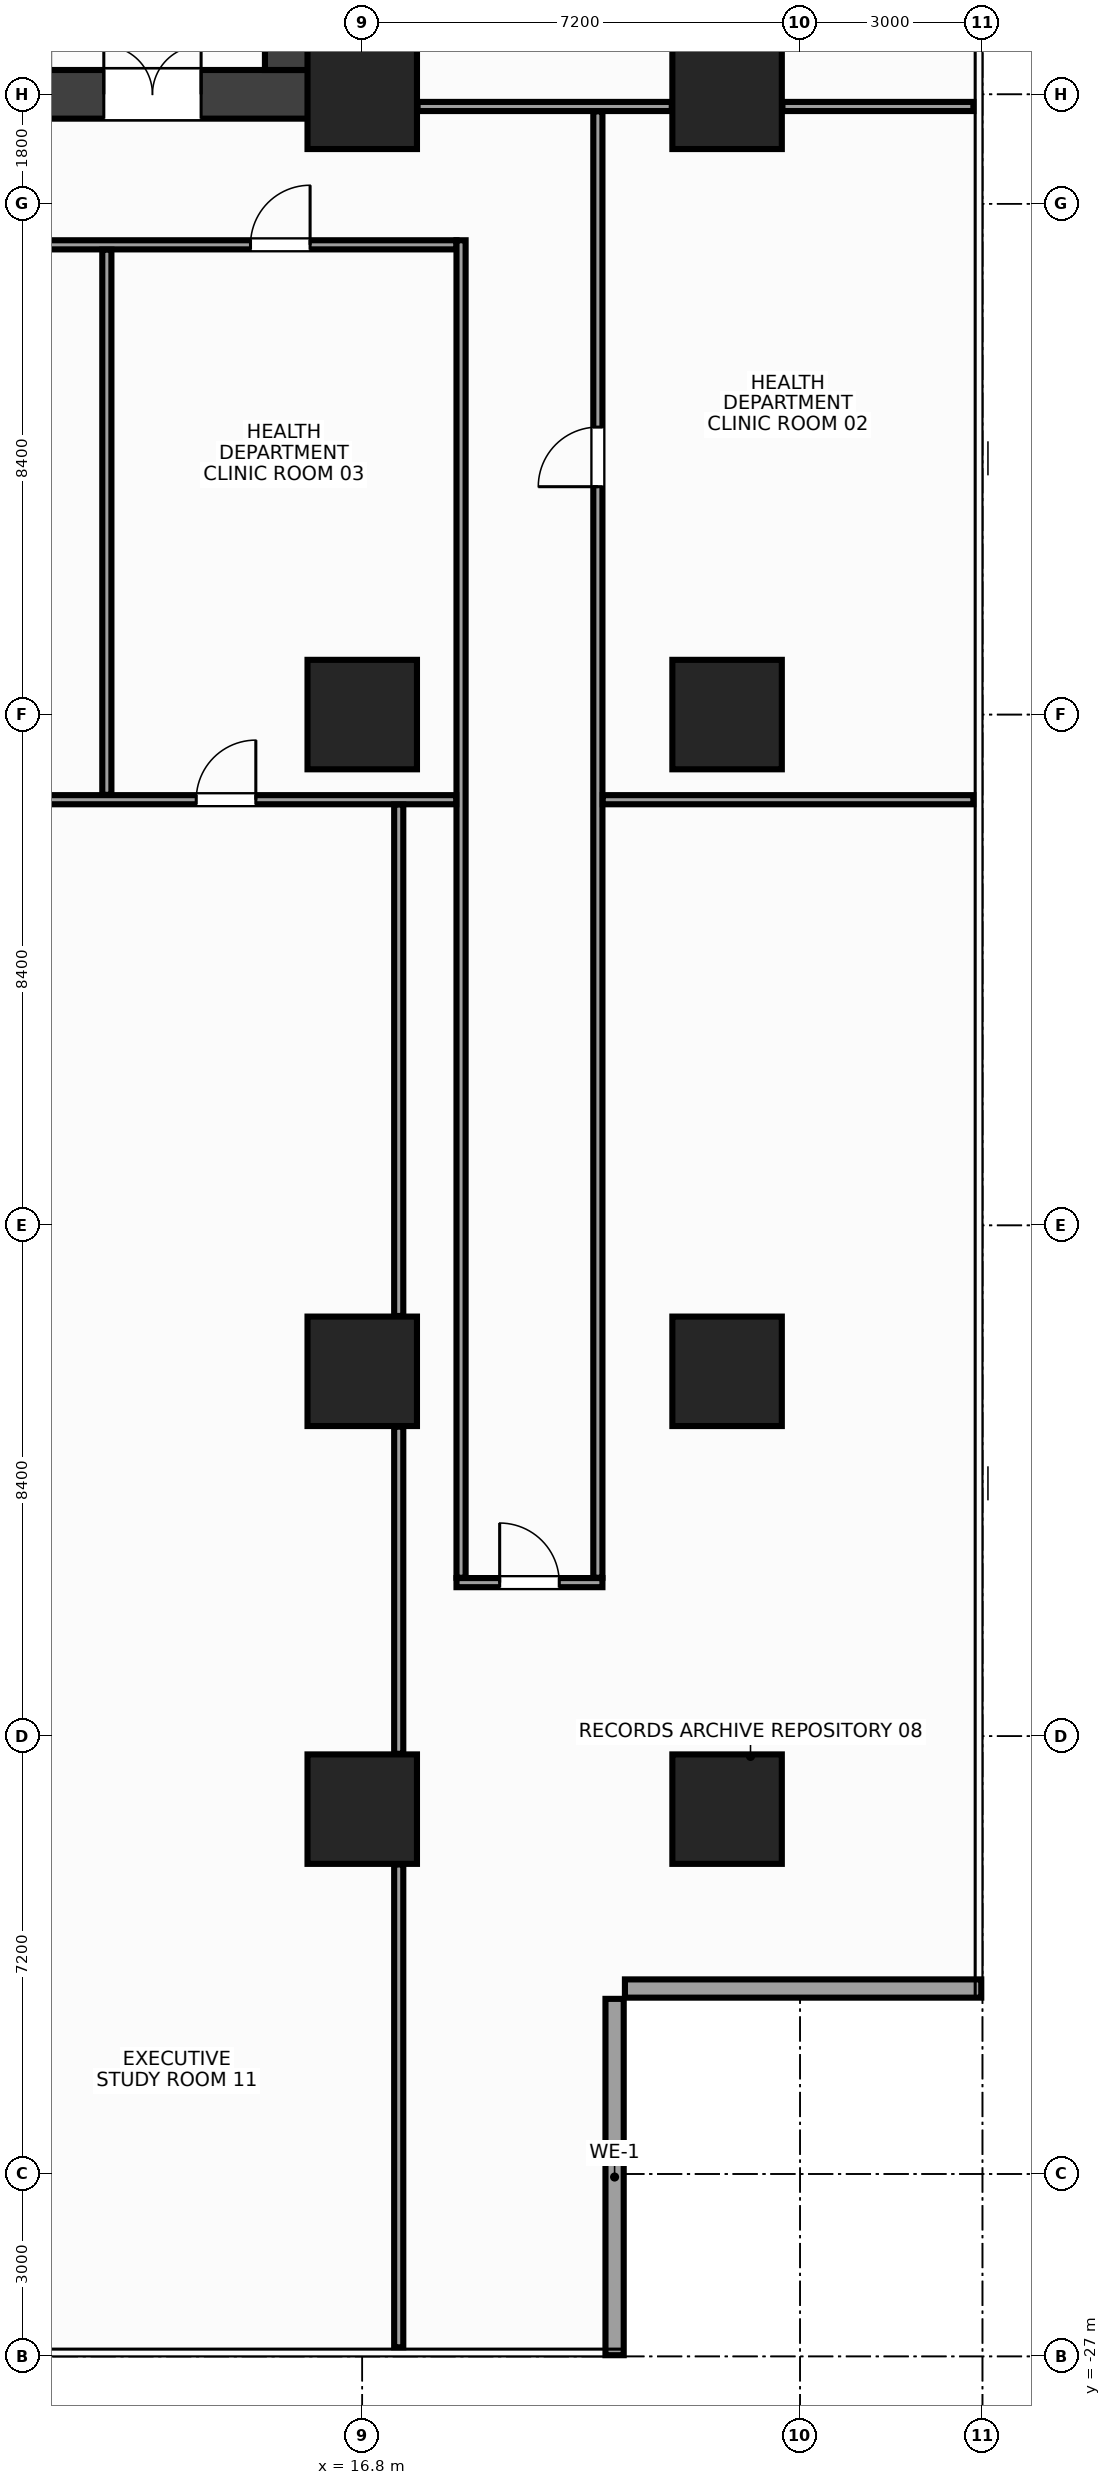
"""IFC4 building model, lengths in metres.
Left out: names, types, materials, properties, quantities, classifications, styles, units other than length and angle.
Written with IfcOpenShell. Run it as: python <this file> out.ifc"""

import sys

from ifc_helpers import new_model, si_unit, direction, frame, frame_2d, origin, origin_2d, place, context, subcontext, project, spatial, rectangle, extrude, source, transform, mapped, element, fill, save


model = new_model("IFC4")
c1 = context("Model", 3, precision=1e-05, world=origin(), true_north=direction((0.0, 1.0)))
c2 = subcontext(c1, "Body", "Model", "MODEL_VIEW")
j1 = project(units=[si_unit("LENGTHUNIT", "METRE"), si_unit("PLANEANGLEUNIT", "RADIAN")], contexts=[c1])
p1 = place(None, origin())
s1 = spatial("IfcSite", under=j1, at=p1, CompositionType="ELEMENT")
p2 = place(p1, origin())
s2 = spatial("IfcBuilding", under=s1, at=p2, CompositionType="ELEMENT")
p3 = place(p2, frame((0.0, 0.0, 52.4)))
s3 = spatial("IfcBuildingStorey", under=s2, at=p3, CompositionType="ELEMENT", Elevation=52.4)
m1 = source(origin(), c2, "Body", "SweptSolid", [
    extrude(rectangle(XDim=32.0, YDim=0.8, at=frame_2d((16.0, 0.0))), origin(), (0.0, 0.0, 1.0), 3.6),
])
p4 = place(p3, frame((-16.0, 10.2, 0.0), z_axis=(0.0, 0.0, 1.0), x_axis=(1.0, 0.0, 0.0)))
e1 = element("IfcWall", 1, at=p4, inside=s3, PredefinedType="SHEAR", context=c2, shape_type="MappedRepresentation", body=[
    mapped(m1, transform((0.0, 0.0, 0.0), x_axis=(1.0, 0.0, 0.0), y_axis=(0.0, 1.0, 0.0), z_axis=(0.0, 0.0, 1.0), scale=1.0)),
])
p5 = place(p4, frame((1.85, 0.0, 0.0)))
e2 = element("IfcOpeningElement", 2, at=p5, cuts=e1, PredefinedType="OPENING", context=c2, shape_type="SweptSolid", body=[
    extrude(rectangle(XDim=1.6, YDim=2.15, at=frame_2d((0.8, 1.075))), frame((0.0, 0.412, 0.0), z_axis=(0.0, -1.0, 0.0), x_axis=(1.0, 0.0, 0.0)), (0.0, 0.0, 1.0), 0.824),
])
p6 = place(p4, frame((28.55, 0.0, 0.0)))
e3 = element("IfcOpeningElement", 3, at=p6, cuts=e1, PredefinedType="OPENING", context=c2, shape_type="SweptSolid", body=[
    extrude(rectangle(XDim=1.6, YDim=2.15, at=frame_2d((0.8, 1.075))), frame((0.0, 0.412, 0.0), z_axis=(0.0, -1.0, 0.0), x_axis=(1.0, 0.0, 0.0)), (0.0, 0.0, 1.0), 0.824),
])
p7 = place(p4, frame((15.25, 0.0, 0.0)))
e4 = element("IfcOpeningElement", 4, at=p7, cuts=e1, PredefinedType="OPENING", context=c2, shape_type="SweptSolid", body=[
    extrude(rectangle(XDim=1.5, YDim=2.2, at=frame_2d((0.75, 1.1))), frame((0.0, 0.412, 0.0), z_axis=(0.0, -1.0, 0.0), x_axis=(1.0, 0.0, 0.0)), (0.0, 0.0, 1.0), 0.824),
])
m2 = source(origin(), c2, "Body", "SweptSolid", [
    extrude(rectangle(XDim=12.8, YDim=0.8, at=frame_2d((6.4, 0.0))), origin(), (0.0, 0.0, 1.0), 3.6),
])
p8 = place(p3, frame((15.6, 10.6, 0.0), z_axis=(0.0, 0.0, 1.0), x_axis=(0.0, 1.0, 0.0)))
e5 = element("IfcWall", 5, at=p8, inside=s3, PredefinedType="SHEAR", context=c2, shape_type="MappedRepresentation", body=[
    mapped(m2, transform((0.0, 0.0, 0.0), x_axis=(1.0, 0.0, 0.0), y_axis=(0.0, 1.0, 0.0), z_axis=(0.0, 0.0, 1.0), scale=1.0)),
])
m3 = source(origin(), c2, "Body", "SweptSolid", [
    extrude(rectangle(XDim=1.8, YDim=1.8, at=origin_2d()), origin(), (0.0, 0.0, 1.0), 3.6),
])
for number, where, z_axis, x_axis in (
    (6, (16.8, -18.0, 0.0), (0.0, 0.0, 1.0), (1.0, 0.0, 0.0)),
    (7, (16.8, -10.8, 0.0), (0.0, 0.0, 1.0), (1.0, 0.0, 0.0)),
    (8, (16.8, 0.0, 0.0), (0.0, 0.0, 1.0), (1.0, 0.0, 0.0)),
    (9, (16.8, 10.2, 0.0), (0.0, 0.0, 1.0), (1.0, 0.0, 0.0)),
    (10, (22.8, -18.0, 0.0), (0.0, 0.0, 1.0), (1.0, 0.0, 0.0)),
    (11, (22.8, -10.8, 0.0), (0.0, 0.0, 1.0), (1.0, 0.0, 0.0)),
    (12, (22.8, 0.0, 0.0), (0.0, 0.0, 1.0), (1.0, 0.0, 0.0)),
    (13, (22.8, 10.2, 0.0), (0.0, 0.0, 1.0), (1.0, 0.0, 0.0)),
):
    element("IfcColumn", number, at=place(p3, frame(where, z_axis=z_axis, x_axis=x_axis)), inside=s3, PredefinedType="COLUMN", context=c2, shape_type="MappedRepresentation", body=[
        mapped(m3, transform((0.0, 0.0, 0.0), x_axis=(1.0, 0.0, 0.0), y_axis=(0.0, 1.0, 0.0), z_axis=(0.0, 0.0, 1.0), scale=1.0)),
    ])
m4 = source(origin(), c2, "Body", "SweptSolid", [
    extrude(rectangle(XDim=5.86, YDim=0.3, at=frame_2d((2.93, 0.0))), origin(), (0.0, 0.0, 1.0), 2.74),
])
for number, where, z_axis, x_axis in (
    (14, (20.95, -26.98, 0.0), (0.0, 0.0, 1.0), (0.0, 1.0, 0.0)),
    (15, (21.12, -20.95, 0.0), (0.0, 0.0, 1.0), (1.0, 0.0, 0.0)),
):
    element("IfcWall", number, at=place(p3, frame(where, z_axis=z_axis, x_axis=x_axis)), inside=s3, PredefinedType="STANDARD", context=c2, shape_type="MappedRepresentation", body=[
        mapped(m4, transform((0.0, 0.0, 0.0), x_axis=(1.0, 0.0, 0.0), y_axis=(0.0, 1.0, 0.0), z_axis=(0.0, 0.0, 1.0), scale=1.0)),
    ])
m5 = source(origin(), c2, "Body", "SweptSolid", [
    extrude(rectangle(XDim=4.18, YDim=0.15, at=frame_2d((2.09, 0.0))), origin(), (0.0, 0.0, 1.0), 2.745),
])
p9 = place(p3, frame((17.71, 10.0, 0.0), z_axis=(0.0, 0.0, 1.0), x_axis=(1.0, 0.0, 0.0)))
e16 = element("IfcWall", 16, at=p9, inside=s3, PredefinedType="PARTITIONING", context=c2, shape_type="MappedRepresentation", body=[
    mapped(m5, transform((0.0, 0.0, 0.0), x_axis=(1.0, 0.0, 0.0), y_axis=(0.0, 1.0, 0.0), z_axis=(0.0, 0.0, 1.0), scale=1.0)),
])
m6 = source(origin(), c2, "Body", "SweptSolid", [
    extrude(rectangle(XDim=3.14, YDim=0.15, at=frame_2d((1.57, 0.0))), origin(), (0.0, 0.0, 1.0), 2.435),
])
p10 = place(p3, frame((23.71, 10.0, 0.0), z_axis=(0.0, 0.0, 1.0), x_axis=(1.0, 0.0, 0.0)))
e17 = element("IfcWall", 17, at=p10, inside=s3, PredefinedType="PARTITIONING", context=c2, shape_type="MappedRepresentation", body=[
    mapped(m6, transform((0.0, 0.0, 0.0), x_axis=(1.0, 0.0, 0.0), y_axis=(0.0, 1.0, 0.0), z_axis=(0.0, 0.0, 1.0), scale=1.0)),
])
m7 = source(origin(), c2, "Body", "SweptSolid", [
    extrude(rectangle(XDim=36.7, YDim=0.15, at=frame_2d((18.35, 0.0))), origin(), (0.0, 0.0, 1.0), 2.745),
])
p11 = place(p3, frame((-18.35, 7.725, 0.0), z_axis=(0.0, 0.0, 1.0), x_axis=(1.0, 0.0, 0.0)))
e18 = element("IfcWall", 18, at=p11, inside=s3, PredefinedType="PARTITIONING", context=c2, shape_type="MappedRepresentation", body=[
    mapped(m7, transform((0.0, 0.0, 0.0), x_axis=(1.0, 0.0, 0.0), y_axis=(0.0, 1.0, 0.0), z_axis=(0.0, 0.0, 1.0), scale=1.0)),
])
p12 = place(p11, frame((33.312, 0.0, 0.0)))
e19 = element("IfcOpeningElement", 19, at=p12, cuts=e18, PredefinedType="OPENING", context=c2, shape_type="SweptSolid", body=[
    extrude(rectangle(XDim=0.98, YDim=2.15, at=frame_2d((0.49, 1.075))), frame((0.0, 0.087, 0.0), z_axis=(0.0, -1.0, 0.0), x_axis=(1.0, 0.0, 0.0)), (0.0, 0.0, 1.0), 0.174),
])
p13 = place(p11, frame((4.107, 0.0, 0.0)))
e20 = element("IfcOpeningElement", 20, at=p13, cuts=e18, PredefinedType="OPENING", context=c2, shape_type="SweptSolid", body=[
    extrude(rectangle(XDim=0.98, YDim=2.15, at=frame_2d((0.49, 1.075))), frame((0.0, 0.087, 0.0), z_axis=(0.0, -1.0, 0.0), x_axis=(1.0, 0.0, 0.0)), (0.0, 0.0, 1.0), 0.174),
])
p14 = place(p11, frame((14.46, 0.0, 0.0)))
e21 = element("IfcOpeningElement", 21, at=p14, cuts=e18, PredefinedType="OPENING", context=c2, shape_type="SweptSolid", body=[
    extrude(rectangle(XDim=0.98, YDim=2.15, at=frame_2d((0.49, 1.075))), frame((0.0, 0.087, 0.0), z_axis=(0.0, -1.0, 0.0), x_axis=(1.0, 0.0, 0.0)), (0.0, 0.0, 1.0), 0.174),
])
p15 = place(p11, frame((25.36, 0.0, 0.0)))
e22 = element("IfcOpeningElement", 22, at=p15, cuts=e18, PredefinedType="OPENING", context=c2, shape_type="SweptSolid", body=[
    extrude(rectangle(XDim=0.98, YDim=2.15, at=frame_2d((0.49, 1.075))), frame((0.0, 0.087, 0.0), z_axis=(0.0, -1.0, 0.0), x_axis=(1.0, 0.0, 0.0)), (0.0, 0.0, 1.0), 0.174),
])
m8 = source(origin(), c2, "Body", "SweptSolid", [
    extrude(rectangle(XDim=2.4, YDim=0.15, at=frame_2d((1.2, 0.0))), origin(), (0.0, 0.0, 1.0), 2.985),
])
p16 = place(p3, frame((18.35, -14.275, 0.0), z_axis=(0.0, 0.0, 1.0), x_axis=(1.0, 0.0, 0.0)))
e23 = element("IfcWall", 23, at=p16, inside=s3, PredefinedType="PARTITIONING", context=c2, shape_type="MappedRepresentation", body=[
    mapped(m8, transform((0.0, 0.0, 0.0), x_axis=(1.0, 0.0, 0.0), y_axis=(0.0, 1.0, 0.0), z_axis=(0.0, 0.0, 1.0), scale=1.0)),
])
p17 = place(p16, frame((0.71, 0.0, 0.0)))
e24 = element("IfcOpeningElement", 24, at=p17, cuts=e23, PredefinedType="OPENING", context=c2, shape_type="SweptSolid", body=[
    extrude(rectangle(XDim=0.98, YDim=2.15, at=frame_2d((0.49, 1.075))), frame((0.0, 0.087, 0.0), z_axis=(0.0, -1.0, 0.0), x_axis=(1.0, 0.0, 0.0)), (0.0, 0.0, 1.0), 0.174),
])
m9 = source(origin(), c2, "Body", "SweptSolid", [
    extrude(rectangle(XDim=21.995, YDim=0.15, at=frame_2d((10.998, 0.0))), origin(), (0.0, 0.0, 1.0), 2.745),
])
p18 = place(p3, frame((18.425, -14.195, 0.0), z_axis=(0.0, 0.0, 1.0), x_axis=(0.0, 1.0, 0.0)))
e25 = element("IfcWall", 25, at=p18, inside=s3, PredefinedType="PARTITIONING", context=c2, shape_type="MappedRepresentation", body=[
    mapped(m9, transform((0.0, 0.0, 0.0), x_axis=(1.0, 0.0, 0.0), y_axis=(0.0, 1.0, 0.0), z_axis=(0.0, 0.0, 1.0), scale=1.0)),
])
m10 = source(origin(), c2, "Body", "SweptSolid", [
    extrude(rectangle(XDim=24.115, YDim=0.15, at=frame_2d((12.058, 0.0))), origin(), (0.0, 0.0, 1.0), 2.745),
])
p19 = place(p3, frame((20.675, -14.195, 0.0), z_axis=(0.0, 0.0, 1.0), x_axis=(0.0, 1.0, 0.0)))
e26 = element("IfcWall", 26, at=p19, inside=s3, PredefinedType="PARTITIONING", context=c2, shape_type="MappedRepresentation", body=[
    mapped(m10, transform((0.0, 0.0, 0.0), x_axis=(1.0, 0.0, 0.0), y_axis=(0.0, 1.0, 0.0), z_axis=(0.0, 0.0, 1.0), scale=1.0)),
])
p20 = place(p19, frame((17.942, 0.0, 0.0)))
e27 = element("IfcOpeningElement", 27, at=p20, cuts=e26, PredefinedType="OPENING", context=c2, shape_type="SweptSolid", body=[
    extrude(rectangle(XDim=0.98, YDim=2.15, at=frame_2d((0.49, 1.075))), frame((0.0, 0.087, 0.0), z_axis=(0.0, -1.0, 0.0), x_axis=(1.0, 0.0, 0.0)), (0.0, 0.0, 1.0), 0.174),
])
m11 = source(origin(), c2, "Body", "SweptSolid", [
    extrude(rectangle(XDim=36.69, YDim=0.15, at=frame_2d((18.345, 0.0))), origin(), (0.0, 0.0, 1.0), 2.745),
])
p21 = place(p3, frame((-18.345, -1.4, 0.0), z_axis=(0.0, 0.0, 1.0), x_axis=(1.0, 0.0, 0.0)))
e28 = element("IfcWall", 28, at=p21, inside=s3, PredefinedType="PARTITIONING", context=c2, shape_type="MappedRepresentation", body=[
    mapped(m11, transform((0.0, 0.0, 0.0), x_axis=(1.0, 0.0, 0.0), y_axis=(0.0, 1.0, 0.0), z_axis=(0.0, 0.0, 1.0), scale=1.0)),
])
p22 = place(p21, frame((14.455, 0.0, 0.0)))
e29 = element("IfcOpeningElement", 29, at=p22, cuts=e28, PredefinedType="OPENING", context=c2, shape_type="SweptSolid", body=[
    extrude(rectangle(XDim=0.98, YDim=2.15, at=frame_2d((0.49, 1.075))), frame((0.0, 0.087, 0.0), z_axis=(0.0, -1.0, 0.0), x_axis=(1.0, 0.0, 0.0)), (0.0, 0.0, 1.0), 0.174),
])
p23 = place(p21, frame((4.055, 0.0, 0.0)))
e30 = element("IfcOpeningElement", 30, at=p23, cuts=e28, PredefinedType="OPENING", context=c2, shape_type="SweptSolid", body=[
    extrude(rectangle(XDim=0.98, YDim=2.15, at=frame_2d((0.49, 1.075))), frame((0.0, 0.087, 0.0), z_axis=(0.0, -1.0, 0.0), x_axis=(1.0, 0.0, 0.0)), (0.0, 0.0, 1.0), 0.174),
])
p24 = place(p21, frame((32.415, 0.0, 0.0)))
e31 = element("IfcOpeningElement", 31, at=p24, cuts=e28, PredefinedType="OPENING", context=c2, shape_type="SweptSolid", body=[
    extrude(rectangle(XDim=0.98, YDim=2.15, at=frame_2d((0.49, 1.075))), frame((0.0, 0.087, 0.0), z_axis=(0.0, -1.0, 0.0), x_axis=(1.0, 0.0, 0.0)), (0.0, 0.0, 1.0), 0.174),
])
m12 = source(origin(), c2, "Body", "SweptSolid", [
    extrude(rectangle(XDim=6.095, YDim=0.15, at=frame_2d((3.048, 0.0))), origin(), (0.0, 0.0, 1.0), 2.745),
])
p25 = place(p3, frame((20.755, -1.4, 0.0), z_axis=(0.0, 0.0, 1.0), x_axis=(1.0, 0.0, 0.0)))
e32 = element("IfcWall", 32, at=p25, inside=s3, PredefinedType="PARTITIONING", context=c2, shape_type="MappedRepresentation", body=[
    mapped(m12, transform((0.0, 0.0, 0.0), x_axis=(1.0, 0.0, 0.0), y_axis=(0.0, 1.0, 0.0), z_axis=(0.0, 0.0, 1.0), scale=1.0)),
])
m13 = source(origin(), c2, "Body", "SweptSolid", [
    extrude(rectangle(XDim=8.965, YDim=0.15, at=frame_2d((4.482, 0.0))), origin(), (0.0, 0.0, 1.0), 2.645),
])
p26 = place(p3, frame((12.6, -1.32, 0.0), z_axis=(0.0, 0.0, 1.0), x_axis=(0.0, 1.0, 0.0)))
e33 = element("IfcWall", 33, at=p26, inside=s3, PredefinedType="PARTITIONING", context=c2, shape_type="MappedRepresentation", body=[
    mapped(m13, transform((0.0, 0.0, 0.0), x_axis=(1.0, 0.0, 0.0), y_axis=(0.0, 1.0, 0.0), z_axis=(0.0, 0.0, 1.0), scale=1.0)),
])
m14 = source(origin(), c2, "Body", "SweptSolid", [
    extrude(rectangle(XDim=7.94, YDim=0.15, at=frame_2d((3.97, 0.0))), origin(), (0.0, 0.0, 1.0), 3.36),
])
p27 = place(p3, frame((17.4, -26.85, 0.0), z_axis=(0.0, 0.0, 1.0), x_axis=(0.0, 1.0, 0.0)))
e34 = element("IfcWall", 34, at=p27, inside=s3, PredefinedType="PARTITIONING", context=c2, shape_type="MappedRepresentation", body=[
    mapped(m14, transform((0.0, 0.0, 0.0), x_axis=(1.0, 0.0, 0.0), y_axis=(0.0, 1.0, 0.0), z_axis=(0.0, 0.0, 1.0), scale=1.0)),
])
m15 = source(origin(), c2, "Body", "SweptSolid", [
    extrude(rectangle(XDim=5.38, YDim=0.15, at=frame_2d((2.69, 0.0))), origin(), (0.0, 0.0, 1.0), 3.36),
])
p28 = place(p3, frame((17.4, -17.09, 0.0), z_axis=(0.0, 0.0, 1.0), x_axis=(0.0, 1.0, 0.0)))
e35 = element("IfcWall", 35, at=p28, inside=s3, PredefinedType="PARTITIONING", context=c2, shape_type="MappedRepresentation", body=[
    mapped(m15, transform((0.0, 0.0, 0.0), x_axis=(1.0, 0.0, 0.0), y_axis=(0.0, 1.0, 0.0), z_axis=(0.0, 0.0, 1.0), scale=1.0)),
])
m16 = source(origin(), c2, "Body", "SweptSolid", [
    extrude(rectangle(XDim=8.41, YDim=0.15, at=frame_2d((4.205, 0.0))), origin(), (0.0, 0.0, 1.0), 3.36),
])
p29 = place(p3, frame((17.4, -9.89, 0.0), z_axis=(0.0, 0.0, 1.0), x_axis=(0.0, 1.0, 0.0)))
e36 = element("IfcWall", 36, at=p29, inside=s3, PredefinedType="PARTITIONING", context=c2, shape_type="MappedRepresentation", body=[
    mapped(m16, transform((0.0, 0.0, 0.0), x_axis=(1.0, 0.0, 0.0), y_axis=(0.0, 1.0, 0.0), z_axis=(0.0, 0.0, 1.0), scale=1.0)),
])
m17 = source(origin(), c2, "Body", "SweptSolid", [
    extrude(rectangle(XDim=1.6, YDim=2.15, at=frame_2d((0.8, 1.075))), frame((0.0, 0.025, 0.0), z_axis=(0.0, -1.0, 0.0), x_axis=(1.0, 0.0, 0.0)), (0.0, 0.0, 1.0), 0.05),
])
p30 = place(p6, origin())
e37 = element("IfcDoor", 37, at=p30, inside=s3, OperationType="DOUBLE_DOOR_SINGLE_SWING", PredefinedType="DOOR", context=c2, shape_type="MappedRepresentation", body=[
    mapped(m17, transform((0.0, 0.0, 0.0), x_axis=(1.0, 0.0, 0.0), y_axis=(0.0, 1.0, 0.0), z_axis=(0.0, 0.0, 1.0), scale=1.0)),
])
fill(e3, e37)
m18 = source(origin(), c2, "Body", "SweptSolid", [
    extrude(rectangle(XDim=0.98, YDim=2.15, at=frame_2d((0.49, 1.075))), frame((0.0, 0.025, 0.0), z_axis=(0.0, -1.0, 0.0), x_axis=(1.0, 0.0, 0.0)), (0.0, 0.0, 1.0), 0.05),
])
p31 = place(p20, origin())
e38 = element("IfcDoor", 38, at=p31, inside=s3, OperationType="SINGLE_SWING_LEFT", PredefinedType="DOOR", context=c2, shape_type="MappedRepresentation", body=[
    mapped(m18, transform((0.0, 0.0, 0.0), x_axis=(1.0, 0.0, 0.0), y_axis=(0.0, 1.0, 0.0), z_axis=(0.0, 0.0, 1.0), scale=1.0)),
])
fill(e27, e38)
p32 = place(p12, origin())
e39 = element("IfcDoor", 39, at=p32, inside=s3, OperationType="SINGLE_SWING_RIGHT", PredefinedType="DOOR", context=c2, shape_type="MappedRepresentation", body=[
    mapped(m18, transform((0.0, 0.0, 0.0), x_axis=(1.0, 0.0, 0.0), y_axis=(0.0, 1.0, 0.0), z_axis=(0.0, 0.0, 1.0), scale=1.0)),
])
fill(e19, e39)
p33 = place(p17, origin())
e40 = element("IfcDoor", 40, at=p33, inside=s3, OperationType="SINGLE_SWING_LEFT", PredefinedType="DOOR", context=c2, shape_type="MappedRepresentation", body=[
    mapped(m18, transform((0.0, 0.0, 0.0), x_axis=(1.0, 0.0, 0.0), y_axis=(0.0, 1.0, 0.0), z_axis=(0.0, 0.0, 1.0), scale=1.0)),
])
fill(e24, e40)
p34 = place(p24, origin())
e41 = element("IfcDoor", 41, at=p34, inside=s3, OperationType="SINGLE_SWING_RIGHT", PredefinedType="DOOR", context=c2, shape_type="MappedRepresentation", body=[
    mapped(m18, transform((0.0, 0.0, 0.0), x_axis=(1.0, 0.0, 0.0), y_axis=(0.0, 1.0, 0.0), z_axis=(0.0, 0.0, 1.0), scale=1.0)),
])
fill(e31, e41)
save(model, sys.argv[1])
